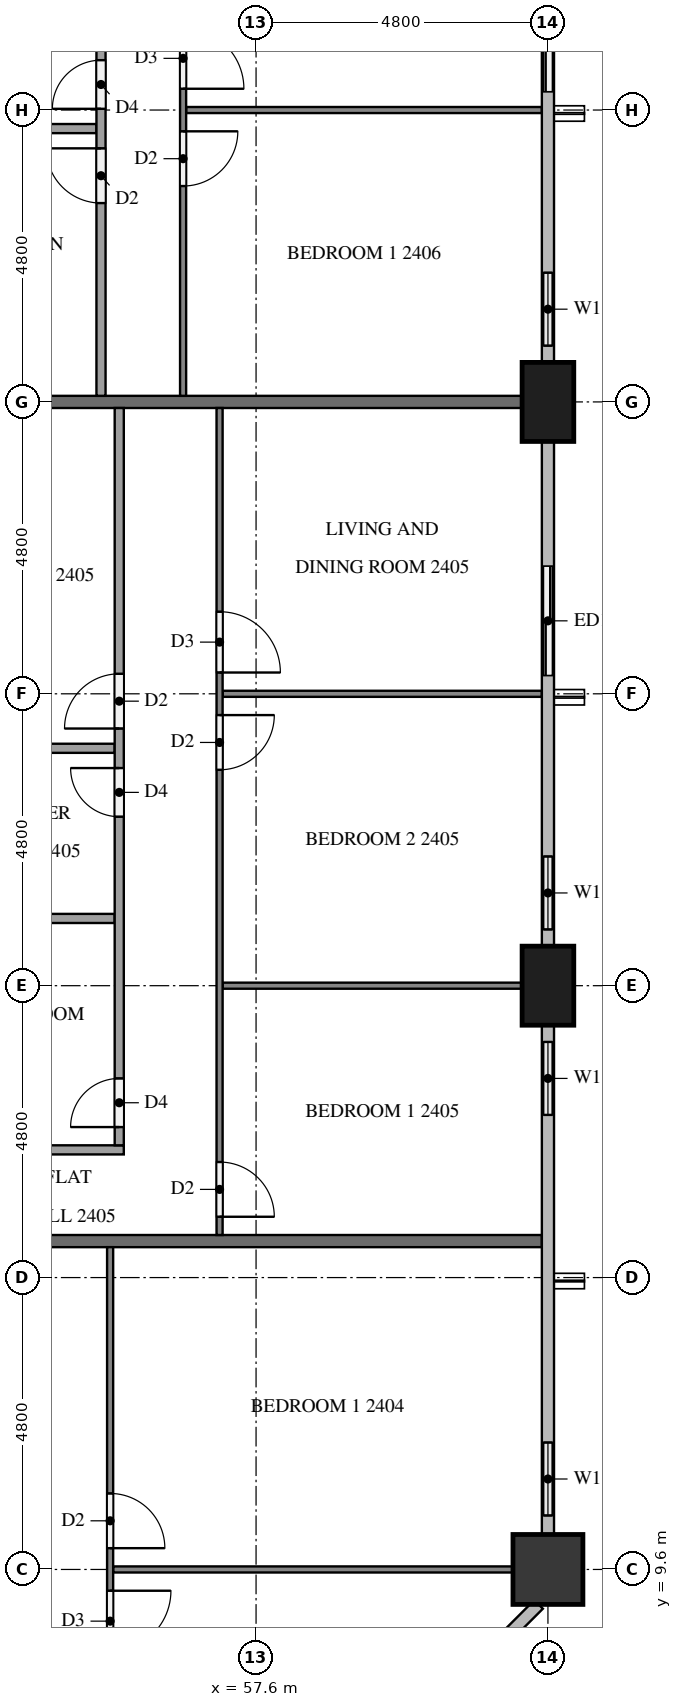
"""IFC4 building model, lengths in metres.
Left out: names, types, materials, properties, quantities, classifications, styles, units other than length and angle.
Written with IfcOpenShell. Run it as: python <this file> out.ifc"""

import sys

from ifc_helpers import new_model, si_unit, direction, frame, frame_2d, origin, origin_2d, place, context, subcontext, project, spatial, rectangle, extrude, element, fill, save


model = new_model("IFC4")
c1 = context("Model", 3, precision=1e-05, world=origin(), true_north=direction((0.0, 1.0)))
c2 = subcontext(c1, "Body", "Model", "MODEL_VIEW")
j1 = project(units=[si_unit("LENGTHUNIT", "METRE"), si_unit("PLANEANGLEUNIT", "RADIAN")], contexts=[c1])
p1 = place(None, origin())
s1 = spatial("IfcSite", under=j1, at=p1, CompositionType="ELEMENT")
p2 = place(p1, origin())
s2 = spatial("IfcBuilding", under=s1, at=p2, CompositionType="ELEMENT")
p3 = place(p2, frame((0.0, 0.0, 96.2)))
s3 = spatial("IfcBuildingStorey", under=s2, at=p3, CompositionType="ELEMENT", Elevation=96.2)
p4 = place(p3, frame((62.4, 9.6, 0.0), z_axis=(0.0, 0.0, 1.0), x_axis=(1.0, 0.0, 0.0)))
e1 = element("IfcColumn", 1, at=p4, inside=s3, PredefinedType="COLUMN", context=c2, shape_type="SweptSolid", body=[
    extrude(rectangle(XDim=1.15, YDim=1.15, at=origin_2d()), origin(), (0.0, 0.0, 1.0), 3.2),
])
for number, where, z_axis, x_axis in (
    (2, (62.4, 19.2, 0.0), (0.0, 0.0, 1.0), (0.0, 1.0, 0.0)),
    (3, (62.4, 28.8, 0.0), (0.0, 0.0, 1.0), (0.0, 1.0, 0.0)),
):
    element("IfcColumn", number, at=place(p3, frame(where, z_axis=z_axis, x_axis=x_axis)), inside=s3, PredefinedType="COLUMN", context=c2, shape_type="SweptSolid", body=[
        extrude(rectangle(XDim=1.3, YDim=0.85, at=origin_2d()), origin(), (0.0, 0.0, 1.0), 3.2),
    ])
p5 = place(p3, frame((62.4, 10.175, 0.0), z_axis=(0.0, 0.0, 1.0), x_axis=(0.0, 1.0, 0.0)))
e4 = element("IfcWall", 4, at=p5, inside=s3, PredefinedType="SOLIDWALL", context=c2, shape_type="SweptSolid", body=[
    extrude(rectangle(XDim=1.825, YDim=0.15, at=frame_2d((0.913, 0.0))), origin(), (0.0, 0.0, 1.0), 3.2),
])
p6 = place(p5, frame((0.312, 0.0, 0.9)))
e5 = element("IfcOpeningElement", 5, at=p6, cuts=e4, PredefinedType="OPENING", context=c2, shape_type="SweptSolid", body=[
    extrude(rectangle(XDim=1.2, YDim=1.4, at=frame_2d((0.6, 0.7))), frame((0.0, 0.085, 0.0), z_axis=(0.0, -1.0, 0.0), x_axis=(1.0, 0.0, 0.0)), (0.0, 0.0, 1.0), 0.17),
])
p7 = place(p3, frame((62.4, 16.8, 0.0), z_axis=(0.0, 0.0, 1.0), x_axis=(0.0, 1.0, 0.0)))
e6 = element("IfcWall", 6, at=p7, inside=s3, PredefinedType="SOLIDWALL", context=c2, shape_type="SweptSolid", body=[
    extrude(rectangle(XDim=1.75, YDim=0.15, at=frame_2d((0.875, 0.0))), origin(), (0.0, 0.0, 1.0), 3.2),
])
p8 = place(p7, frame((0.275, 0.0, 0.9)))
e7 = element("IfcOpeningElement", 7, at=p8, cuts=e6, PredefinedType="OPENING", context=c2, shape_type="SweptSolid", body=[
    extrude(rectangle(XDim=1.2, YDim=1.4, at=frame_2d((0.6, 0.7))), frame((0.0, 0.085, 0.0), z_axis=(0.0, -1.0, 0.0), x_axis=(1.0, 0.0, 0.0)), (0.0, 0.0, 1.0), 0.17),
])
p9 = place(p3, frame((62.4, 19.85, 0.0), z_axis=(0.0, 0.0, 1.0), x_axis=(0.0, 1.0, 0.0)))
e8 = element("IfcWall", 8, at=p9, inside=s3, PredefinedType="SOLIDWALL", context=c2, shape_type="SweptSolid", body=[
    extrude(rectangle(XDim=1.75, YDim=0.15, at=frame_2d((0.875, 0.0))), origin(), (0.0, 0.0, 1.0), 3.2),
])
p10 = place(p9, frame((0.275, 0.0, 0.9)))
e9 = element("IfcOpeningElement", 9, at=p10, cuts=e8, PredefinedType="OPENING", context=c2, shape_type="SweptSolid", body=[
    extrude(rectangle(XDim=1.2, YDim=1.4, at=frame_2d((0.6, 0.7))), frame((0.0, 0.085, 0.0), z_axis=(0.0, -1.0, 0.0), x_axis=(1.0, 0.0, 0.0)), (0.0, 0.0, 1.0), 0.17),
])
p11 = place(p3, frame((62.4, 24.0, 0.0), z_axis=(0.0, 0.0, 1.0), x_axis=(0.0, 1.0, 0.0)))
e10 = element("IfcWall", 10, at=p11, inside=s3, PredefinedType="SOLIDWALL", context=c2, shape_type="SweptSolid", body=[
    extrude(rectangle(XDim=2.4, YDim=0.15, at=frame_2d((1.2, 0.0))), origin(), (0.0, 0.0, 1.0), 3.2),
])
p12 = place(p11, frame((0.3, 0.0, 0.0)))
e11 = element("IfcOpeningElement", 11, at=p12, cuts=e10, PredefinedType="OPENING", context=c2, shape_type="SweptSolid", body=[
    extrude(rectangle(XDim=1.8, YDim=2.4, at=frame_2d((0.9, 1.2))), frame((0.0, 0.085, 0.0), z_axis=(0.0, -1.0, 0.0), x_axis=(1.0, 0.0, 0.0)), (0.0, 0.0, 1.0), 0.17),
])
p13 = place(p3, frame((62.4, 29.45, 0.0), z_axis=(0.0, 0.0, 1.0), x_axis=(0.0, 1.0, 0.0)))
e12 = element("IfcWall", 12, at=p13, inside=s3, PredefinedType="SOLIDWALL", context=c2, shape_type="SweptSolid", body=[
    extrude(rectangle(XDim=1.75, YDim=0.15, at=frame_2d((0.875, 0.0))), origin(), (0.0, 0.0, 1.0), 3.2),
])
p14 = place(p13, frame((0.275, 0.0, 0.9)))
e13 = element("IfcOpeningElement", 13, at=p14, cuts=e12, PredefinedType="OPENING", context=c2, shape_type="SweptSolid", body=[
    extrude(rectangle(XDim=1.2, YDim=1.4, at=frame_2d((0.6, 0.7))), frame((0.0, 0.085, 0.0), z_axis=(0.0, -1.0, 0.0), x_axis=(1.0, 0.0, 0.0)), (0.0, 0.0, 1.0), 0.17),
])
p15 = place(p3, frame((62.4, 33.6, 0.0), z_axis=(0.0, 0.0, 1.0), x_axis=(0.0, 1.0, 0.0)))
e14 = element("IfcWall", 14, at=p15, inside=s3, PredefinedType="SOLIDWALL", context=c2, shape_type="SweptSolid", body=[
    extrude(rectangle(XDim=2.4, YDim=0.15, at=frame_2d((1.2, 0.0))), origin(), (0.0, 0.0, 1.0), 3.2),
])
p16 = place(p15, frame((0.3, 0.0, 0.0)))
e15 = element("IfcOpeningElement", 15, at=p16, cuts=e14, PredefinedType="OPENING", context=c2, shape_type="SweptSolid", body=[
    extrude(rectangle(XDim=1.8, YDim=2.4, at=frame_2d((0.9, 1.2))), frame((0.0, 0.085, 0.0), z_axis=(0.0, -1.0, 0.0), x_axis=(1.0, 0.0, 0.0)), (0.0, 0.0, 1.0), 0.17),
])
p17 = place(p3, frame((52.5, 15.0, 0.0), z_axis=(0.0, 0.0, 1.0), x_axis=(1.0, 0.0, 0.0)))
e16 = element("IfcWall", 16, at=p17, inside=s3, PredefinedType="PARTITIONING", context=c2, shape_type="SweptSolid", body=[
    extrude(rectangle(XDim=9.8, YDim=0.2, at=frame_2d((4.9, 0.0))), origin(), (0.0, 0.0, 1.0), 3.2),
])
p18 = place(p3, frame((52.5, 28.8, 0.0), z_axis=(0.0, 0.0, 1.0), x_axis=(1.0, 0.0, 0.0)))
e17 = element("IfcWall", 17, at=p18, inside=s3, PredefinedType="PARTITIONING", context=c2, shape_type="SweptSolid", body=[
    extrude(rectangle(XDim=9.475, YDim=0.2, at=frame_2d((4.738, 0.0))), origin(), (0.0, 0.0, 1.0), 3.2),
])
p19 = place(p3, frame((55.25, 9.6, 0.0), z_axis=(0.0, 0.0, 1.0), x_axis=(1.0, 0.0, 0.0)))
e18 = element("IfcWall", 18, at=p19, inside=s3, PredefinedType="PARTITIONING", context=c2, shape_type="SweptSolid", body=[
    extrude(rectangle(XDim=6.575, YDim=0.1, at=frame_2d((3.288, 0.0))), origin(), (0.0, 0.0, 1.0), 3.2),
])
p20 = place(p3, frame((55.2, 14.9, 0.0), z_axis=(0.0, 0.0, 1.0), x_axis=(0.0, -1.0, 0.0)))
e19 = element("IfcWall", 19, at=p20, inside=s3, PredefinedType="PARTITIONING", context=c2, shape_type="SweptSolid", body=[
    extrude(rectangle(XDim=10.0, YDim=0.1, at=frame_2d((5.0, 0.0))), origin(), (0.0, 0.0, 1.0), 3.2),
])
p21 = place(p20, frame((4.05, 0.0, 0.0)))
e20 = element("IfcOpeningElement", 20, at=p21, cuts=e19, PredefinedType="OPENING", context=c2, shape_type="SweptSolid", body=[
    extrude(rectangle(XDim=0.9, YDim=2.1, at=frame_2d((0.45, 1.05))), frame((0.0, 0.06, 0.0), z_axis=(0.0, -1.0, 0.0), x_axis=(1.0, 0.0, 0.0)), (0.0, 0.0, 1.0), 0.12),
])
p22 = place(p20, frame((5.65, 0.0, 0.0)))
e21 = element("IfcOpeningElement", 21, at=p22, cuts=e19, PredefinedType="OPENING", context=c2, shape_type="SweptSolid", body=[
    extrude(rectangle(XDim=1.0, YDim=2.1, at=frame_2d((0.5, 1.05))), frame((0.0, 0.06, 0.0), z_axis=(0.0, -1.0, 0.0), x_axis=(1.0, 0.0, 0.0)), (0.0, 0.0, 1.0), 0.12),
])
p23 = place(p3, frame((57.05, 19.2, 0.0), z_axis=(0.0, 0.0, 1.0), x_axis=(1.0, 0.0, 0.0)))
e22 = element("IfcWall", 22, at=p23, inside=s3, PredefinedType="PARTITIONING", context=c2, shape_type="SweptSolid", body=[
    extrude(rectangle(XDim=4.925, YDim=0.1, at=frame_2d((2.462, 0.0))), origin(), (0.0, 0.0, 1.0), 3.2),
])
p24 = place(p3, frame((57.05, 24.0, 0.0), z_axis=(0.0, 0.0, 1.0), x_axis=(1.0, 0.0, 0.0)))
e23 = element("IfcWall", 23, at=p24, inside=s3, PredefinedType="PARTITIONING", context=c2, shape_type="SweptSolid", body=[
    extrude(rectangle(XDim=5.25, YDim=0.1, at=frame_2d((2.625, 0.0))), origin(), (0.0, 0.0, 1.0), 3.2),
])
p25 = place(p3, frame((57.0, 28.7, 0.0), z_axis=(0.0, 0.0, 1.0), x_axis=(0.0, -1.0, 0.0)))
e24 = element("IfcWall", 24, at=p25, inside=s3, PredefinedType="PARTITIONING", context=c2, shape_type="SweptSolid", body=[
    extrude(rectangle(XDim=13.6, YDim=0.1, at=frame_2d((6.8, 0.0))), origin(), (0.0, 0.0, 1.0), 3.2),
])
p26 = place(p25, frame((12.4, 0.0, 0.0)))
e25 = element("IfcOpeningElement", 25, at=p26, cuts=e24, PredefinedType="OPENING", context=c2, shape_type="SweptSolid", body=[
    extrude(rectangle(XDim=0.9, YDim=2.1, at=frame_2d((0.45, 1.05))), frame((0.0, 0.06, 0.0), z_axis=(0.0, -1.0, 0.0), x_axis=(1.0, 0.0, 0.0)), (0.0, 0.0, 1.0), 0.12),
])
p27 = place(p25, frame((5.05, 0.0, 0.0)))
e26 = element("IfcOpeningElement", 26, at=p27, cuts=e24, PredefinedType="OPENING", context=c2, shape_type="SweptSolid", body=[
    extrude(rectangle(XDim=0.9, YDim=2.1, at=frame_2d((0.45, 1.05))), frame((0.0, 0.06, 0.0), z_axis=(0.0, -1.0, 0.0), x_axis=(1.0, 0.0, 0.0)), (0.0, 0.0, 1.0), 0.12),
])
p28 = place(p25, frame((3.35, 0.0, 0.0)))
e27 = element("IfcOpeningElement", 27, at=p28, cuts=e24, PredefinedType="OPENING", context=c2, shape_type="SweptSolid", body=[
    extrude(rectangle(XDim=1.0, YDim=2.1, at=frame_2d((0.5, 1.05))), frame((0.0, 0.06, 0.0), z_axis=(0.0, -1.0, 0.0), x_axis=(1.0, 0.0, 0.0)), (0.0, 0.0, 1.0), 0.12),
])
for number, where, z_axis, x_axis in (
    (28, (52.5, 20.306, 0.0), (0.0, 0.0, 1.0), (1.0, 0.0, 0.0)),
    (29, (52.5, 23.104, 0.0), (0.0, 0.0, 1.0), (1.0, 0.0, 0.0)),
):
    element("IfcWall", number, at=place(p3, frame(where, z_axis=z_axis, x_axis=x_axis)), inside=s3, PredefinedType="PARTITIONING", context=c2, shape_type="SweptSolid", body=[
        extrude(rectangle(XDim=2.775, YDim=0.15, at=frame_2d((1.387, 0.0))), origin(), (0.0, 0.0, 1.0), 3.2),
    ])
p29 = place(p3, frame((52.5, 16.5, 0.0), z_axis=(0.0, 0.0, 1.0), x_axis=(1.0, 0.0, 0.0)))
e30 = element("IfcWall", 30, at=p29, inside=s3, PredefinedType="PARTITIONING", context=c2, shape_type="SweptSolid", body=[
    extrude(rectangle(XDim=2.925, YDim=0.15, at=frame_2d((1.462, 0.0))), origin(), (0.0, 0.0, 1.0), 3.2),
])
p30 = place(p3, frame((55.35, 16.575, 0.0), z_axis=(0.0, 0.0, 1.0), x_axis=(0.0, 1.0, 0.0)))
e31 = element("IfcWall", 31, at=p30, inside=s3, PredefinedType="PARTITIONING", context=c2, shape_type="SweptSolid", body=[
    extrude(rectangle(XDim=12.125, YDim=0.15, at=frame_2d((6.062, 0.0))), origin(), (0.0, 0.0, 1.0), 3.2),
])
p31 = place(p30, frame((0.3, 0.0, 0.0)))
e32 = element("IfcOpeningElement", 32, at=p31, cuts=e31, PredefinedType="OPENING", context=c2, shape_type="SweptSolid", body=[
    extrude(rectangle(XDim=0.8, YDim=2.1, at=frame_2d((0.4, 1.05))), frame((0.0, 0.085, 0.0), z_axis=(0.0, -1.0, 0.0), x_axis=(1.0, 0.0, 0.0)), (0.0, 0.0, 1.0), 0.17),
])
p32 = place(p30, frame((5.404, 0.0, 0.0)))
e33 = element("IfcOpeningElement", 33, at=p32, cuts=e31, PredefinedType="OPENING", context=c2, shape_type="SweptSolid", body=[
    extrude(rectangle(XDim=0.8, YDim=2.1, at=frame_2d((0.4, 1.05))), frame((0.0, 0.085, 0.0), z_axis=(0.0, -1.0, 0.0), x_axis=(1.0, 0.0, 0.0)), (0.0, 0.0, 1.0), 0.17),
])
p33 = place(p30, frame((6.854, 0.0, 0.0)))
e34 = element("IfcOpeningElement", 34, at=p33, cuts=e31, PredefinedType="OPENING", context=c2, shape_type="SweptSolid", body=[
    extrude(rectangle(XDim=0.9, YDim=2.1, at=frame_2d((0.45, 1.05))), frame((0.0, 0.085, 0.0), z_axis=(0.0, -1.0, 0.0), x_axis=(1.0, 0.0, 0.0)), (0.0, 0.0, 1.0), 0.17),
])
p34 = place(p3, frame((56.45, 33.6, 0.0), z_axis=(0.0, 0.0, 1.0), x_axis=(1.0, 0.0, 0.0)))
e35 = element("IfcWall", 35, at=p34, inside=s3, PredefinedType="PARTITIONING", context=c2, shape_type="SweptSolid", body=[
    extrude(rectangle(XDim=5.85, YDim=0.1, at=frame_2d((2.925, 0.0))), origin(), (0.0, 0.0, 1.0), 3.2),
])
p35 = place(p3, frame((56.4, 37.7, 0.0), z_axis=(0.0, 0.0, 1.0), x_axis=(0.0, -1.0, 0.0)))
e36 = element("IfcWall", 36, at=p35, inside=s3, PredefinedType="PARTITIONING", context=c2, shape_type="SweptSolid", body=[
    extrude(rectangle(XDim=8.8, YDim=0.1, at=frame_2d((4.4, 0.0))), origin(), (0.0, 0.0, 1.0), 3.2),
])
p36 = place(p35, frame((2.75, 0.0, 0.0)))
e37 = element("IfcOpeningElement", 37, at=p36, cuts=e36, PredefinedType="OPENING", context=c2, shape_type="SweptSolid", body=[
    extrude(rectangle(XDim=1.0, YDim=2.1, at=frame_2d((0.5, 1.05))), frame((0.0, 0.06, 0.0), z_axis=(0.0, -1.0, 0.0), x_axis=(1.0, 0.0, 0.0)), (0.0, 0.0, 1.0), 0.12),
])
p37 = place(p35, frame((4.45, 0.0, 0.0)))
e38 = element("IfcOpeningElement", 38, at=p37, cuts=e36, PredefinedType="OPENING", context=c2, shape_type="SweptSolid", body=[
    extrude(rectangle(XDim=0.9, YDim=2.1, at=frame_2d((0.45, 1.05))), frame((0.0, 0.06, 0.0), z_axis=(0.0, -1.0, 0.0), x_axis=(1.0, 0.0, 0.0)), (0.0, 0.0, 1.0), 0.12),
])
p38 = place(p3, frame((52.5, 33.295, 0.0), z_axis=(0.0, 0.0, 1.0), x_axis=(1.0, 0.0, 0.0)))
e39 = element("IfcWall", 39, at=p38, inside=s3, PredefinedType="PARTITIONING", context=c2, shape_type="SweptSolid", body=[
    extrude(rectangle(XDim=2.475, YDim=0.15, at=frame_2d((1.238, 0.0))), origin(), (0.0, 0.0, 1.0), 3.2),
])
p39 = place(p3, frame((55.05, 28.9, 0.0), z_axis=(0.0, 0.0, 1.0), x_axis=(0.0, 1.0, 0.0)))
e40 = element("IfcWall", 40, at=p39, inside=s3, PredefinedType="PARTITIONING", context=c2, shape_type="SweptSolid", body=[
    extrude(rectangle(XDim=7.325, YDim=0.15, at=frame_2d((3.663, 0.0))), origin(), (0.0, 0.0, 1.0), 3.2),
])
p40 = place(p39, frame((4.72, 0.0, 0.0)))
e41 = element("IfcOpeningElement", 41, at=p40, cuts=e40, PredefinedType="OPENING", context=c2, shape_type="SweptSolid", body=[
    extrude(rectangle(XDim=0.8, YDim=2.1, at=frame_2d((0.4, 1.05))), frame((0.0, 0.085, 0.0), z_axis=(0.0, -1.0, 0.0), x_axis=(1.0, 0.0, 0.0)), (0.0, 0.0, 1.0), 0.17),
])
p41 = place(p39, frame((3.17, 0.0, 0.0)))
e42 = element("IfcOpeningElement", 42, at=p41, cuts=e40, PredefinedType="OPENING", context=c2, shape_type="SweptSolid", body=[
    extrude(rectangle(XDim=0.9, YDim=2.1, at=frame_2d((0.45, 1.05))), frame((0.0, 0.085, 0.0), z_axis=(0.0, -1.0, 0.0), x_axis=(1.0, 0.0, 0.0)), (0.0, 0.0, 1.0), 0.17),
])
p42 = place(p6, origin())
e43 = element("IfcWindow", 43, at=p42, inside=s3, PartitioningType="SINGLE_PANEL", PredefinedType="WINDOW", context=c2, shape_type="SweptSolid", body=[
    extrude(rectangle(XDim=1.2, YDim=1.4, at=frame_2d((0.6, 0.7))), frame((0.0, 0.03, 0.0), z_axis=(0.0, -1.0, 0.0), x_axis=(1.0, 0.0, 0.0)), (0.0, 0.0, 1.0), 0.06),
])
fill(e5, e43)
p43 = place(p8, origin())
e44 = element("IfcWindow", 44, at=p43, inside=s3, PartitioningType="SINGLE_PANEL", PredefinedType="WINDOW", context=c2, shape_type="SweptSolid", body=[
    extrude(rectangle(XDim=1.2, YDim=1.4, at=frame_2d((0.6, 0.7))), frame((0.0, 0.03, 0.0), z_axis=(0.0, -1.0, 0.0), x_axis=(1.0, 0.0, 0.0)), (0.0, 0.0, 1.0), 0.06),
])
fill(e7, e44)
p44 = place(p10, origin())
e45 = element("IfcWindow", 45, at=p44, inside=s3, PartitioningType="SINGLE_PANEL", PredefinedType="WINDOW", context=c2, shape_type="SweptSolid", body=[
    extrude(rectangle(XDim=1.2, YDim=1.4, at=frame_2d((0.6, 0.7))), frame((0.0, 0.03, 0.0), z_axis=(0.0, -1.0, 0.0), x_axis=(1.0, 0.0, 0.0)), (0.0, 0.0, 1.0), 0.06),
])
fill(e9, e45)
p45 = place(p12, origin())
e46 = element("IfcDoor", 46, at=p45, inside=s3, OperationType="SLIDING_TO_RIGHT", PredefinedType="DOOR", context=c2, shape_type="SweptSolid", body=[
    extrude(rectangle(XDim=1.8, YDim=2.4, at=frame_2d((0.9, 1.2))), frame((0.0, 0.025, 0.0), z_axis=(0.0, -1.0, 0.0), x_axis=(1.0, 0.0, 0.0)), (0.0, 0.0, 1.0), 0.05),
])
fill(e11, e46)
p46 = place(p14, origin())
e47 = element("IfcWindow", 47, at=p46, inside=s3, PartitioningType="SINGLE_PANEL", PredefinedType="WINDOW", context=c2, shape_type="SweptSolid", body=[
    extrude(rectangle(XDim=1.2, YDim=1.4, at=frame_2d((0.6, 0.7))), frame((0.0, 0.03, 0.0), z_axis=(0.0, -1.0, 0.0), x_axis=(1.0, 0.0, 0.0)), (0.0, 0.0, 1.0), 0.06),
])
fill(e13, e47)
p47 = place(p16, origin())
e48 = element("IfcDoor", 48, at=p47, inside=s3, OperationType="SLIDING_TO_LEFT", PredefinedType="DOOR", context=c2, shape_type="SweptSolid", body=[
    extrude(rectangle(XDim=1.8, YDim=2.4, at=frame_2d((0.9, 1.2))), frame((0.0, 0.025, 0.0), z_axis=(0.0, -1.0, 0.0), x_axis=(1.0, 0.0, 0.0)), (0.0, 0.0, 1.0), 0.05),
])
fill(e15, e48)
p48 = place(p21, origin())
e49 = element("IfcDoor", 49, at=p48, inside=s3, OperationType="SINGLE_SWING_RIGHT", PredefinedType="DOOR", context=c2, shape_type="SweptSolid", body=[
    extrude(rectangle(XDim=0.9, YDim=2.1, at=frame_2d((0.45, 1.05))), frame((0.0, 0.025, 0.0), z_axis=(0.0, -1.0, 0.0), x_axis=(1.0, 0.0, 0.0)), (0.0, 0.0, 1.0), 0.05),
])
fill(e20, e49)
p49 = place(p22, origin())
e50 = element("IfcDoor", 50, at=p49, inside=s3, OperationType="SINGLE_SWING_LEFT", PredefinedType="DOOR", context=c2, shape_type="SweptSolid", body=[
    extrude(rectangle(XDim=1.0, YDim=2.1, at=frame_2d((0.5, 1.05))), frame((0.0, 0.025, 0.0), z_axis=(0.0, -1.0, 0.0), x_axis=(1.0, 0.0, 0.0)), (0.0, 0.0, 1.0), 0.05),
])
fill(e21, e50)
p50 = place(p26, origin())
e51 = element("IfcDoor", 51, at=p50, inside=s3, OperationType="SINGLE_SWING_RIGHT", PredefinedType="DOOR", context=c2, shape_type="SweptSolid", body=[
    extrude(rectangle(XDim=0.9, YDim=2.1, at=frame_2d((0.45, 1.05))), frame((0.0, 0.025, 0.0), z_axis=(0.0, -1.0, 0.0), x_axis=(1.0, 0.0, 0.0)), (0.0, 0.0, 1.0), 0.05),
])
fill(e25, e51)
p51 = place(p27, origin())
e52 = element("IfcDoor", 52, at=p51, inside=s3, OperationType="SINGLE_SWING_LEFT", PredefinedType="DOOR", context=c2, shape_type="SweptSolid", body=[
    extrude(rectangle(XDim=0.9, YDim=2.1, at=frame_2d((0.45, 1.05))), frame((0.0, 0.025, 0.0), z_axis=(0.0, -1.0, 0.0), x_axis=(1.0, 0.0, 0.0)), (0.0, 0.0, 1.0), 0.05),
])
fill(e26, e52)
p52 = place(p28, origin())
e53 = element("IfcDoor", 53, at=p52, inside=s3, OperationType="SINGLE_SWING_RIGHT", PredefinedType="DOOR", context=c2, shape_type="SweptSolid", body=[
    extrude(rectangle(XDim=1.0, YDim=2.1, at=frame_2d((0.5, 1.05))), frame((0.0, 0.025, 0.0), z_axis=(0.0, -1.0, 0.0), x_axis=(1.0, 0.0, 0.0)), (0.0, 0.0, 1.0), 0.05),
])
fill(e27, e53)
p53 = place(p31, origin())
e54 = element("IfcDoor", 54, at=p53, inside=s3, OperationType="SINGLE_SWING_LEFT", PredefinedType="DOOR", context=c2, shape_type="SweptSolid", body=[
    extrude(rectangle(XDim=0.8, YDim=2.1, at=frame_2d((0.4, 1.05))), frame((0.0, 0.025, 0.0), z_axis=(0.0, -1.0, 0.0), x_axis=(1.0, 0.0, 0.0)), (0.0, 0.0, 1.0), 0.05),
])
fill(e32, e54)
p54 = place(p32, origin())
e55 = element("IfcDoor", 55, at=p54, inside=s3, OperationType="SINGLE_SWING_RIGHT", PredefinedType="DOOR", context=c2, shape_type="SweptSolid", body=[
    extrude(rectangle(XDim=0.8, YDim=2.1, at=frame_2d((0.4, 1.05))), frame((0.0, 0.025, 0.0), z_axis=(0.0, -1.0, 0.0), x_axis=(1.0, 0.0, 0.0)), (0.0, 0.0, 1.0), 0.05),
])
fill(e33, e55)
p55 = place(p33, origin())
e56 = element("IfcDoor", 56, at=p55, inside=s3, OperationType="SINGLE_SWING_LEFT", PredefinedType="DOOR", context=c2, shape_type="SweptSolid", body=[
    extrude(rectangle(XDim=0.9, YDim=2.1, at=frame_2d((0.45, 1.05))), frame((0.0, 0.025, 0.0), z_axis=(0.0, -1.0, 0.0), x_axis=(1.0, 0.0, 0.0)), (0.0, 0.0, 1.0), 0.05),
])
fill(e34, e56)
p56 = place(p36, origin())
e57 = element("IfcDoor", 57, at=p56, inside=s3, OperationType="SINGLE_SWING_RIGHT", PredefinedType="DOOR", context=c2, shape_type="SweptSolid", body=[
    extrude(rectangle(XDim=1.0, YDim=2.1, at=frame_2d((0.5, 1.05))), frame((0.0, 0.025, 0.0), z_axis=(0.0, -1.0, 0.0), x_axis=(1.0, 0.0, 0.0)), (0.0, 0.0, 1.0), 0.05),
])
fill(e37, e57)
p57 = place(p37, origin())
e58 = element("IfcDoor", 58, at=p57, inside=s3, OperationType="SINGLE_SWING_LEFT", PredefinedType="DOOR", context=c2, shape_type="SweptSolid", body=[
    extrude(rectangle(XDim=0.9, YDim=2.1, at=frame_2d((0.45, 1.05))), frame((0.0, 0.025, 0.0), z_axis=(0.0, -1.0, 0.0), x_axis=(1.0, 0.0, 0.0)), (0.0, 0.0, 1.0), 0.05),
])
fill(e38, e58)
p58 = place(p40, origin())
e59 = element("IfcDoor", 59, at=p58, inside=s3, OperationType="SINGLE_SWING_LEFT", PredefinedType="DOOR", context=c2, shape_type="SweptSolid", body=[
    extrude(rectangle(XDim=0.8, YDim=2.1, at=frame_2d((0.4, 1.05))), frame((0.0, 0.025, 0.0), z_axis=(0.0, -1.0, 0.0), x_axis=(1.0, 0.0, 0.0)), (0.0, 0.0, 1.0), 0.05),
])
fill(e41, e59)
p59 = place(p41, origin())
e60 = element("IfcDoor", 60, at=p59, inside=s3, OperationType="SINGLE_SWING_RIGHT", PredefinedType="DOOR", context=c2, shape_type="SweptSolid", body=[
    extrude(rectangle(XDim=0.9, YDim=2.1, at=frame_2d((0.45, 1.05))), frame((0.0, 0.025, 0.0), z_axis=(0.0, -1.0, 0.0), x_axis=(1.0, 0.0, 0.0)), (0.0, 0.0, 1.0), 0.05),
])
fill(e42, e60)
save(model, sys.argv[1])
